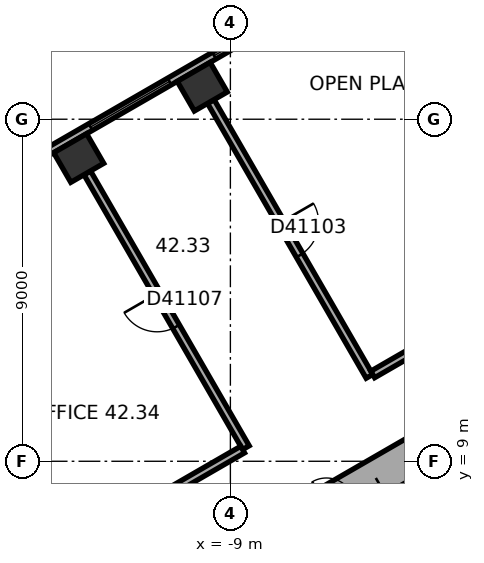
"""IFC4 building model, lengths in metres.
Left out: names, types, materials, properties, quantities, classifications, styles, units other than length and angle.
Written with IfcOpenShell. Run it as: python <this file> out.ifc"""

import sys

from ifc_helpers import new_model, si_unit, direction, frame, frame_2d, origin, origin_2d, place, context, subcontext, project, spatial, rectangle, extrude, element, fill, save


model = new_model("IFC4")
c1 = context("Model", 3, precision=1e-05, world=origin(), true_north=direction((0.0, 1.0)))
c2 = subcontext(c1, "Body", "Model", "MODEL_VIEW")
j1 = project(units=[si_unit("LENGTHUNIT", "METRE"), si_unit("PLANEANGLEUNIT", "RADIAN")], contexts=[c1])
p1 = place(None, origin())
s1 = spatial("IfcSite", under=j1, at=p1, CompositionType="ELEMENT")
p2 = place(p1, origin())
s2 = spatial("IfcBuilding", under=s1, at=p2, CompositionType="ELEMENT")
p3 = place(p2, frame((0.0, 0.0, 172.5)))
s3 = spatial("IfcBuildingStorey", under=s2, at=p3, CompositionType="ELEMENT", Elevation=172.5)
for number, where, z_axis, x_axis in (
    (1, (-9.74, 18.856, 0.0), (0.0, 0.0, 1.0), (-0.866, -0.5, 0.0)),
    (2, (-12.991, 16.979, 0.0), (0.0, 0.0, 1.0), (-0.866, -0.5, 0.0)),
):
    element("IfcColumn", number, at=place(p3, frame(where, z_axis=z_axis, x_axis=x_axis)), inside=s3, PredefinedType="COLUMN", context=c2, shape_type="SweptSolid", body=[
        extrude(rectangle(XDim=1.0, YDim=0.9, at=origin_2d()), origin(), (0.0, 0.0, 1.0), 3.7),
    ])
p4 = place(p3, frame((0.25, 11.691, 0.0), z_axis=(0.0, 0.0, 1.0), x_axis=(-0.866022616891, -0.50000482701, 0.0)))
e3 = element("IfcWall", 3, at=p4, inside=s3, PredefinedType="SHEAR", context=c2, shape_type="SweptSolid", body=[
    extrude(rectangle(XDim=12.125, YDim=1.0, at=frame_2d((6.062, 0.0))), origin(), (0.0, 0.0, 1.0), 3.7),
])
p5 = place(p4, frame((6.262, 0.0, 0.0)))
e4 = element("IfcOpeningElement", 4, at=p5, cuts=e3, PredefinedType="OPENING", context=c2, shape_type="SweptSolid", body=[
    extrude(rectangle(XDim=1.5, YDim=2.1, at=frame_2d((0.75, 1.05))), frame((0.0, 0.51, 0.0), z_axis=(0.0, -1.0, 0.0), x_axis=(1.0, 0.0, 0.0)), (0.0, 0.0, 1.0), 1.02),
])
p6 = place(p4, frame((3.112, 0.0, 0.0)))
e5 = element("IfcOpeningElement", 5, at=p6, cuts=e3, PredefinedType="OPENING", context=c2, shape_type="SweptSolid", body=[
    extrude(rectangle(XDim=0.9, YDim=2.1, at=frame_2d((0.45, 1.05))), frame((0.0, 0.51, 0.0), z_axis=(0.0, -1.0, 0.0), x_axis=(1.0, 0.0, 0.0)), (0.0, 0.0, 1.0), 1.02),
])
p7 = place(p3, frame((-2.961, 23.405, 0.0), z_axis=(0.0, 0.0, 1.0), x_axis=(-0.866023315909, -0.500003616288, 0.0)))
e6 = element("IfcWall", 6, at=p7, inside=s3, PredefinedType="STANDARD", context=c2, shape_type="SweptSolid", body=[
    extrude(rectangle(XDim=20.044, YDim=0.2, at=frame_2d((10.022, 0.0))), origin(), (0.0, 0.0, 1.0), 3.7),
])
p8 = place(p7, frame((1.314, 0.0, 0.9)))
e7 = element("IfcOpeningElement", 7, at=p8, cuts=e6, PredefinedType="OPENING", context=c2, shape_type="SweptSolid", body=[
    extrude(rectangle(XDim=2.4, YDim=2.0, at=frame_2d((1.2, 1.0))), frame((0.0, 0.11, 0.0), z_axis=(0.0, -1.0, 0.0), x_axis=(1.0, 0.0, 0.0)), (0.0, 0.0, 1.0), 0.22),
])
p9 = place(p7, frame((5.069, 0.0, 0.9)))
e8 = element("IfcOpeningElement", 8, at=p9, cuts=e6, PredefinedType="OPENING", context=c2, shape_type="SweptSolid", body=[
    extrude(rectangle(XDim=2.4, YDim=2.0, at=frame_2d((1.2, 1.0))), frame((0.0, 0.11, 0.0), z_axis=(0.0, -1.0, 0.0), x_axis=(1.0, 0.0, 0.0)), (0.0, 0.0, 1.0), 0.22),
])
p10 = place(p7, frame((8.823, 0.0, 0.9)))
e9 = element("IfcOpeningElement", 9, at=p10, cuts=e6, PredefinedType="OPENING", context=c2, shape_type="SweptSolid", body=[
    extrude(rectangle(XDim=2.4, YDim=2.0, at=frame_2d((1.2, 1.0))), frame((0.0, 0.11, 0.0), z_axis=(0.0, -1.0, 0.0), x_axis=(1.0, 0.0, 0.0)), (0.0, 0.0, 1.0), 0.22),
])
p11 = place(p7, frame((12.577, 0.0, 0.9)))
e10 = element("IfcOpeningElement", 10, at=p11, cuts=e6, PredefinedType="OPENING", context=c2, shape_type="SweptSolid", body=[
    extrude(rectangle(XDim=2.4, YDim=2.0, at=frame_2d((1.2, 1.0))), frame((0.0, 0.11, 0.0), z_axis=(0.0, -1.0, 0.0), x_axis=(1.0, 0.0, 0.0)), (0.0, 0.0, 1.0), 0.22),
])
p12 = place(p7, frame((16.331, 0.0, 0.9)))
e11 = element("IfcOpeningElement", 11, at=p12, cuts=e6, PredefinedType="OPENING", context=c2, shape_type="SweptSolid", body=[
    extrude(rectangle(XDim=2.4, YDim=2.0, at=frame_2d((1.2, 1.0))), frame((0.0, 0.11, 0.0), z_axis=(0.0, -1.0, 0.0), x_axis=(1.0, 0.0, 0.0)), (0.0, 0.0, 1.0), 0.22),
])
p13 = place(p3, frame((-12.766, 16.589, 0.0), z_axis=(0.0, 0.0, 1.0), x_axis=(0.500010139422, -0.866019549707, 0.0)))
e12 = element("IfcWall", 12, at=p13, inside=s3, PredefinedType="PARTITIONING", context=c2, shape_type="SweptSolid", body=[
    extrude(rectangle(XDim=8.35, YDim=0.2, at=frame_2d((4.175, 0.0))), origin(), (0.0, 0.0, 1.0), 3.42),
])
p14 = place(p13, frame((3.675, 0.0, 0.0)))
e13 = element("IfcOpeningElement", 13, at=p14, cuts=e12, PredefinedType="OPENING", context=c2, shape_type="SweptSolid", body=[
    extrude(rectangle(XDim=1.0, YDim=2.1, at=frame_2d((0.5, 1.05))), frame((0.0, 0.11, 0.0), z_axis=(0.0, -1.0, 0.0), x_axis=(1.0, 0.0, 0.0)), (0.0, 0.0, 1.0), 0.22),
])
p15 = place(p3, frame((-9.515, 18.466, 0.0), z_axis=(0.0, 0.0, 1.0), x_axis=(0.500010139422, -0.866019549707, 0.0)))
e14 = element("IfcWall", 14, at=p15, inside=s3, PredefinedType="PARTITIONING", context=c2, shape_type="SweptSolid", body=[
    extrude(rectangle(XDim=8.35, YDim=0.2, at=frame_2d((4.175, 0.0))), origin(), (0.0, 0.0, 1.0), 2.87),
])
p16 = place(p15, frame((3.675, 0.0, 0.0)))
e15 = element("IfcOpeningElement", 15, at=p16, cuts=e14, PredefinedType="OPENING", context=c2, shape_type="SweptSolid", body=[
    extrude(rectangle(XDim=1.0, YDim=2.1, at=frame_2d((0.5, 1.05))), frame((0.0, 0.11, 0.0), z_axis=(0.0, -1.0, 0.0), x_axis=(1.0, 0.0, 0.0)), (0.0, 0.0, 1.0), 0.22),
])
p17 = place(p3, frame((-8.678, 9.308, 0.0), z_axis=(0.0, 0.0, 1.0), x_axis=(-0.866000359435, -0.500043375578, 0.0)))
e16 = element("IfcWall", 16, at=p17, inside=s3, PredefinedType="PARTITIONING", context=c2, shape_type="SweptSolid", body=[
    extrude(rectangle(XDim=3.161, YDim=0.2, at=frame_2d((1.581, 0.0))), origin(), (0.0, 0.0, 1.0), 3.42),
])
p18 = place(p3, frame((-0.95, 13.77, 0.0), z_axis=(0.0, 0.0, 1.0), x_axis=(-0.866036689987, -0.499980451214, 0.0)))
e17 = element("IfcWall", 17, at=p18, inside=s3, PredefinedType="PARTITIONING", context=c2, shape_type="SweptSolid", body=[
    extrude(rectangle(XDim=4.969, YDim=0.2, at=frame_2d((2.485, 0.0))), origin(), (0.0, 0.0, 1.0), 3.42),
])
p19 = place(p9, origin())
e18 = element("IfcWindow", 18, at=p19, inside=s3, PartitioningType="SINGLE_PANEL", PredefinedType="WINDOW", context=c2, shape_type="SweptSolid", body=[
    extrude(rectangle(XDim=2.4, YDim=2.0, at=frame_2d((1.2, 1.0))), frame((0.0, 0.03, 0.0), z_axis=(0.0, -1.0, 0.0), x_axis=(1.0, 0.0, 0.0)), (0.0, 0.0, 1.0), 0.06),
])
fill(e8, e18)
p20 = place(p10, origin())
e19 = element("IfcWindow", 19, at=p20, inside=s3, PartitioningType="SINGLE_PANEL", PredefinedType="WINDOW", context=c2, shape_type="SweptSolid", body=[
    extrude(rectangle(XDim=2.4, YDim=2.0, at=frame_2d((1.2, 1.0))), frame((0.0, 0.03, 0.0), z_axis=(0.0, -1.0, 0.0), x_axis=(1.0, 0.0, 0.0)), (0.0, 0.0, 1.0), 0.06),
])
fill(e9, e19)
p21 = place(p5, origin())
e20 = element("IfcDoor", 20, at=p21, inside=s3, OperationType="DOUBLE_DOOR_SINGLE_SWING", PredefinedType="DOOR", context=c2, shape_type="SweptSolid", body=[
    extrude(rectangle(XDim=1.5, YDim=2.1, at=frame_2d((0.75, 1.05))), frame((0.0, 0.025, 0.0), z_axis=(0.0, -1.0, 0.0), x_axis=(1.0, 0.0, 0.0)), (0.0, 0.0, 1.0), 0.05),
])
fill(e4, e20)
p22 = place(p16, origin())
e21 = element("IfcDoor", 21, at=p22, inside=s3, OperationType="SINGLE_SWING_LEFT", PredefinedType="DOOR", context=c2, shape_type="SweptSolid", body=[
    extrude(rectangle(XDim=1.0, YDim=2.1, at=frame_2d((0.5, 1.05))), frame((0.0, 0.025, 0.0), z_axis=(0.0, -1.0, 0.0), x_axis=(1.0, 0.0, 0.0)), (0.0, 0.0, 1.0), 0.05),
])
fill(e15, e21)
p23 = place(p14, origin())
e22 = element("IfcDoor", 22, at=p23, inside=s3, OperationType="SINGLE_SWING_LEFT", PredefinedType="DOOR", context=c2, shape_type="SweptSolid", body=[
    extrude(rectangle(XDim=1.0, YDim=2.1, at=frame_2d((0.5, 1.05))), frame((0.0, 0.025, 0.0), z_axis=(0.0, -1.0, 0.0), x_axis=(1.0, 0.0, 0.0)), (0.0, 0.0, 1.0), 0.05),
])
fill(e13, e22)
save(model, sys.argv[1])
